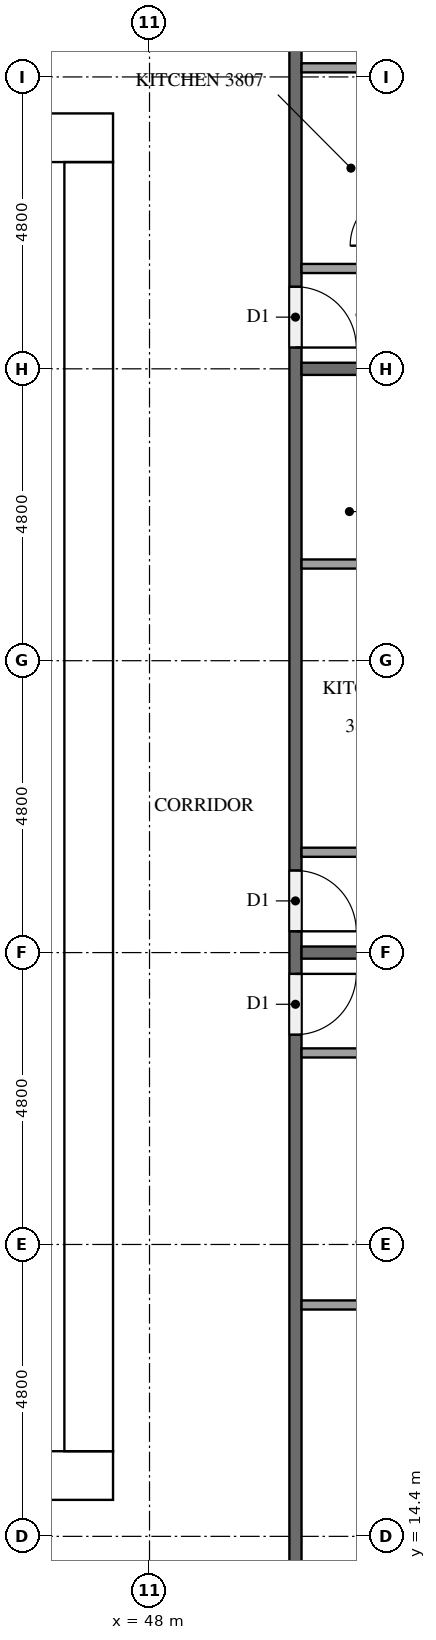
"""IFC4 building model, lengths in metres.
Left out: names, types, materials, properties, quantities, classifications, styles, units other than length and angle.
Written with IfcOpenShell. Run it as: python <this file> out.ifc"""

import sys

from ifc_helpers import new_model, si_unit, direction, frame, frame_2d, origin, place, context, subcontext, project, spatial, rectangle, extrude, element, fill, save


model = new_model("IFC4")
c1 = context("Model", 3, precision=1e-05, world=origin(), true_north=direction((0.0, 1.0)))
c2 = subcontext(c1, "Body", "Model", "MODEL_VIEW")
j1 = project(units=[si_unit("LENGTHUNIT", "METRE"), si_unit("PLANEANGLEUNIT", "RADIAN")], contexts=[c1])
p1 = place(None, origin())
s1 = spatial("IfcSite", under=j1, at=p1, CompositionType="ELEMENT")
p2 = place(p1, origin())
s2 = spatial("IfcBuilding", under=s1, at=p2, CompositionType="ELEMENT")
p3 = place(p2, frame((0.0, 0.0, 149.0)))
s3 = spatial("IfcBuildingStorey", under=s2, at=p3, CompositionType="ELEMENT", Elevation=149.0)
p4 = place(p3, frame((15.0, 15.4, 0.0), z_axis=(0.0, 0.0, 1.0), x_axis=(1.0, 0.0, 0.0)))
e1 = element("IfcWall", 1, at=p4, inside=s3, PredefinedType="SHEAR", context=c2, shape_type="SweptSolid", body=[
    extrude(rectangle(XDim=32.4, YDim=0.8, at=frame_2d((16.2, 0.0))), origin(), (0.0, 0.0, 1.0), 3.2),
])
p5 = place(p4, frame((15.3, 0.0, 0.0)))
e2 = element("IfcOpeningElement", 2, at=p5, cuts=e1, PredefinedType="OPENING", context=c2, shape_type="SweptSolid", body=[
    extrude(rectangle(XDim=1.8, YDim=2.1, at=frame_2d((0.9, 1.05))), frame((0.0, 0.41, 0.0), z_axis=(0.0, -1.0, 0.0), x_axis=(1.0, 0.0, 0.0)), (0.0, 0.0, 1.0), 0.82),
])
p6 = place(p3, frame((15.0, 37.4, 0.0), z_axis=(0.0, 0.0, 1.0), x_axis=(1.0, 0.0, 0.0)))
e3 = element("IfcWall", 3, at=p6, inside=s3, PredefinedType="SHEAR", context=c2, shape_type="SweptSolid", body=[
    extrude(rectangle(XDim=32.4, YDim=0.8, at=frame_2d((16.2, 0.0))), origin(), (0.0, 0.0, 1.0), 3.2),
])
p7 = place(p6, frame((15.3, 0.0, 0.0)))
e4 = element("IfcOpeningElement", 4, at=p7, cuts=e3, PredefinedType="OPENING", context=c2, shape_type="SweptSolid", body=[
    extrude(rectangle(XDim=1.8, YDim=2.1, at=frame_2d((0.9, 1.05))), frame((0.0, 0.41, 0.0), z_axis=(0.0, -1.0, 0.0), x_axis=(1.0, 0.0, 0.0)), (0.0, 0.0, 1.0), 0.82),
])
p8 = place(p6, frame((1.51, 0.0, 0.0)))
e5 = element("IfcOpeningElement", 5, at=p8, cuts=e3, PredefinedType="OPENING", context=c2, shape_type="SweptSolid", body=[
    extrude(rectangle(XDim=1.0, YDim=2.1, at=frame_2d((0.5, 1.05))), frame((0.0, 0.41, 0.0), z_axis=(0.0, -1.0, 0.0), x_axis=(1.0, 0.0, 0.0)), (0.0, 0.0, 1.0), 0.82),
])
p9 = place(p6, frame((5.11, 0.0, 0.0)))
e6 = element("IfcOpeningElement", 6, at=p9, cuts=e3, PredefinedType="OPENING", context=c2, shape_type="SweptSolid", body=[
    extrude(rectangle(XDim=1.0, YDim=2.1, at=frame_2d((0.5, 1.05))), frame((0.0, 0.41, 0.0), z_axis=(0.0, -1.0, 0.0), x_axis=(1.0, 0.0, 0.0)), (0.0, 0.0, 1.0), 0.82),
])
p10 = place(p3, frame((47.0, 15.8, 0.0), z_axis=(0.0, 0.0, 1.0), x_axis=(0.0, 1.0, 0.0)))
e7 = element("IfcWall", 7, at=p10, inside=s3, PredefinedType="SHEAR", context=c2, shape_type="SweptSolid", body=[
    extrude(rectangle(XDim=21.2, YDim=0.8, at=frame_2d((10.6, 0.0))), origin(), (0.0, 0.0, 1.0), 3.2),
])
p11 = place(p10, frame((10.3, 0.0, 0.0)))
e8 = element("IfcOpeningElement", 8, at=p11, cuts=e7, PredefinedType="OPENING", context=c2, shape_type="SweptSolid", body=[
    extrude(rectangle(XDim=1.2, YDim=2.1, at=frame_2d((0.6, 1.05))), frame((0.0, 0.41, 0.0), z_axis=(0.0, -1.0, 0.0), x_axis=(1.0, 0.0, 0.0)), (0.0, 0.0, 1.0), 0.82),
])
p12 = place(p3, frame((50.4, 40.7, 0.0), z_axis=(0.0, 0.0, 1.0), x_axis=(0.0, -1.0, 0.0)))
e9 = element("IfcWall", 9, at=p12, inside=s3, PredefinedType="PARTITIONING", context=c2, shape_type="SweptSolid", body=[
    extrude(rectangle(XDim=28.6, YDim=0.2, at=frame_2d((14.3, 0.0))), origin(), (0.0, 0.0, 1.0), 3.2),
])
p13 = place(p12, frame((17.05, 0.0, 0.0)))
e10 = element("IfcOpeningElement", 10, at=p13, cuts=e9, PredefinedType="OPENING", context=c2, shape_type="SweptSolid", body=[
    extrude(rectangle(XDim=1.0, YDim=2.1, at=frame_2d((0.5, 1.05))), frame((0.0, 0.11, 0.0), z_axis=(0.0, -1.0, 0.0), x_axis=(1.0, 0.0, 0.0)), (0.0, 0.0, 1.0), 0.22),
])
p14 = place(p12, frame((15.35, 0.0, 0.0)))
e11 = element("IfcOpeningElement", 11, at=p14, cuts=e9, PredefinedType="OPENING", context=c2, shape_type="SweptSolid", body=[
    extrude(rectangle(XDim=1.0, YDim=2.1, at=frame_2d((0.5, 1.05))), frame((0.0, 0.11, 0.0), z_axis=(0.0, -1.0, 0.0), x_axis=(1.0, 0.0, 0.0)), (0.0, 0.0, 1.0), 0.22),
])
p15 = place(p12, frame((5.75, 0.0, 0.0)))
e12 = element("IfcOpeningElement", 12, at=p15, cuts=e9, PredefinedType="OPENING", context=c2, shape_type="SweptSolid", body=[
    extrude(rectangle(XDim=1.0, YDim=2.1, at=frame_2d((0.5, 1.05))), frame((0.0, 0.11, 0.0), z_axis=(0.0, -1.0, 0.0), x_axis=(1.0, 0.0, 0.0)), (0.0, 0.0, 1.0), 0.22),
])
for number, where, z_axis, x_axis in (
    (13, (50.5, 24.0, 0.0), (0.0, 0.0, 1.0), (1.0, 0.0, 0.0)),
    (14, (50.5, 33.6, 0.0), (0.0, 0.0, 1.0), (1.0, 0.0, 0.0)),
):
    element("IfcWall", number, at=place(p3, frame(where, z_axis=z_axis, x_axis=x_axis)), inside=s3, PredefinedType="PARTITIONING", context=c2, shape_type="SweptSolid", body=[
        extrude(rectangle(XDim=6.725, YDim=0.2, at=frame_2d((3.363, 0.0))), origin(), (0.0, 0.0, 1.0), 3.2),
    ])
p16 = place(p3, frame((50.5, 18.205, 0.0), z_axis=(0.0, 0.0, 1.0), x_axis=(1.0, 0.0, 0.0)))
e15 = element("IfcWall", 15, at=p16, inside=s3, PredefinedType="PARTITIONING", context=c2, shape_type="SweptSolid", body=[
    extrude(rectangle(XDim=1.925, YDim=0.15, at=frame_2d((0.962, 0.0))), origin(), (0.0, 0.0, 1.0), 3.2),
])
for number, where, z_axis, x_axis in (
    (16, (50.5, 22.35, 0.0), (0.0, 0.0, 1.0), (1.0, 0.0, 0.0)),
    (17, (50.5, 30.39, 0.0), (0.0, 0.0, 1.0), (1.0, 0.0, 0.0)),
):
    element("IfcWall", number, at=place(p3, frame(where, z_axis=z_axis, x_axis=x_axis)), inside=s3, PredefinedType="PARTITIONING", context=c2, shape_type="SweptSolid", body=[
        extrude(rectangle(XDim=2.075, YDim=0.15, at=frame_2d((1.038, 0.0))), origin(), (0.0, 0.0, 1.0), 3.2),
    ])
p17 = place(p3, frame((50.5, 25.65, 0.0), z_axis=(0.0, 0.0, 1.0), x_axis=(1.0, 0.0, 0.0)))
e18 = element("IfcWall", 18, at=p17, inside=s3, PredefinedType="PARTITIONING", context=c2, shape_type="SweptSolid", body=[
    extrude(rectangle(XDim=2.225, YDim=0.15, at=frame_2d((1.113, 0.0))), origin(), (0.0, 0.0, 1.0), 3.2),
])
p18 = place(p3, frame((50.5, 38.55, 0.0), z_axis=(0.0, 0.0, 1.0), x_axis=(1.0, 0.0, 0.0)))
e19 = element("IfcWall", 19, at=p18, inside=s3, PredefinedType="PARTITIONING", context=c2, shape_type="SweptSolid", body=[
    extrude(rectangle(XDim=1.625, YDim=0.15, at=frame_2d((0.812, 0.0))), origin(), (0.0, 0.0, 1.0), 3.2),
])
p19 = place(p3, frame((50.5, 35.25, 0.0), z_axis=(0.0, 0.0, 1.0), x_axis=(1.0, 0.0, 0.0)))
e20 = element("IfcWall", 20, at=p19, inside=s3, PredefinedType="PARTITIONING", context=c2, shape_type="SweptSolid", body=[
    extrude(rectangle(XDim=1.775, YDim=0.15, at=frame_2d((0.887, 0.0))), origin(), (0.0, 0.0, 1.0), 3.2),
])
p20 = place(p11, origin())
e21 = element("IfcDoor", 21, at=p20, inside=s3, OperationType="SINGLE_SWING_RIGHT", PredefinedType="DOOR", context=c2, shape_type="SweptSolid", body=[
    extrude(rectangle(XDim=1.2, YDim=2.1, at=frame_2d((0.6, 1.05))), frame((0.0, 0.025, 0.0), z_axis=(0.0, -1.0, 0.0), x_axis=(1.0, 0.0, 0.0)), (0.0, 0.0, 1.0), 0.05),
])
fill(e8, e21)
p21 = place(p13, origin())
e22 = element("IfcDoor", 22, at=p21, inside=s3, OperationType="SINGLE_SWING_LEFT", PredefinedType="DOOR", context=c2, shape_type="SweptSolid", body=[
    extrude(rectangle(XDim=1.0, YDim=2.1, at=frame_2d((0.5, 1.05))), frame((0.0, 0.025, 0.0), z_axis=(0.0, -1.0, 0.0), x_axis=(1.0, 0.0, 0.0)), (0.0, 0.0, 1.0), 0.05),
])
fill(e10, e22)
p22 = place(p14, origin())
e23 = element("IfcDoor", 23, at=p22, inside=s3, OperationType="SINGLE_SWING_RIGHT", PredefinedType="DOOR", context=c2, shape_type="SweptSolid", body=[
    extrude(rectangle(XDim=1.0, YDim=2.1, at=frame_2d((0.5, 1.05))), frame((0.0, 0.025, 0.0), z_axis=(0.0, -1.0, 0.0), x_axis=(1.0, 0.0, 0.0)), (0.0, 0.0, 1.0), 0.05),
])
fill(e11, e23)
p23 = place(p15, origin())
e24 = element("IfcDoor", 24, at=p23, inside=s3, OperationType="SINGLE_SWING_RIGHT", PredefinedType="DOOR", context=c2, shape_type="SweptSolid", body=[
    extrude(rectangle(XDim=1.0, YDim=2.1, at=frame_2d((0.5, 1.05))), frame((0.0, 0.025, 0.0), z_axis=(0.0, -1.0, 0.0), x_axis=(1.0, 0.0, 0.0)), (0.0, 0.0, 1.0), 0.05),
])
fill(e12, e24)
save(model, sys.argv[1])
